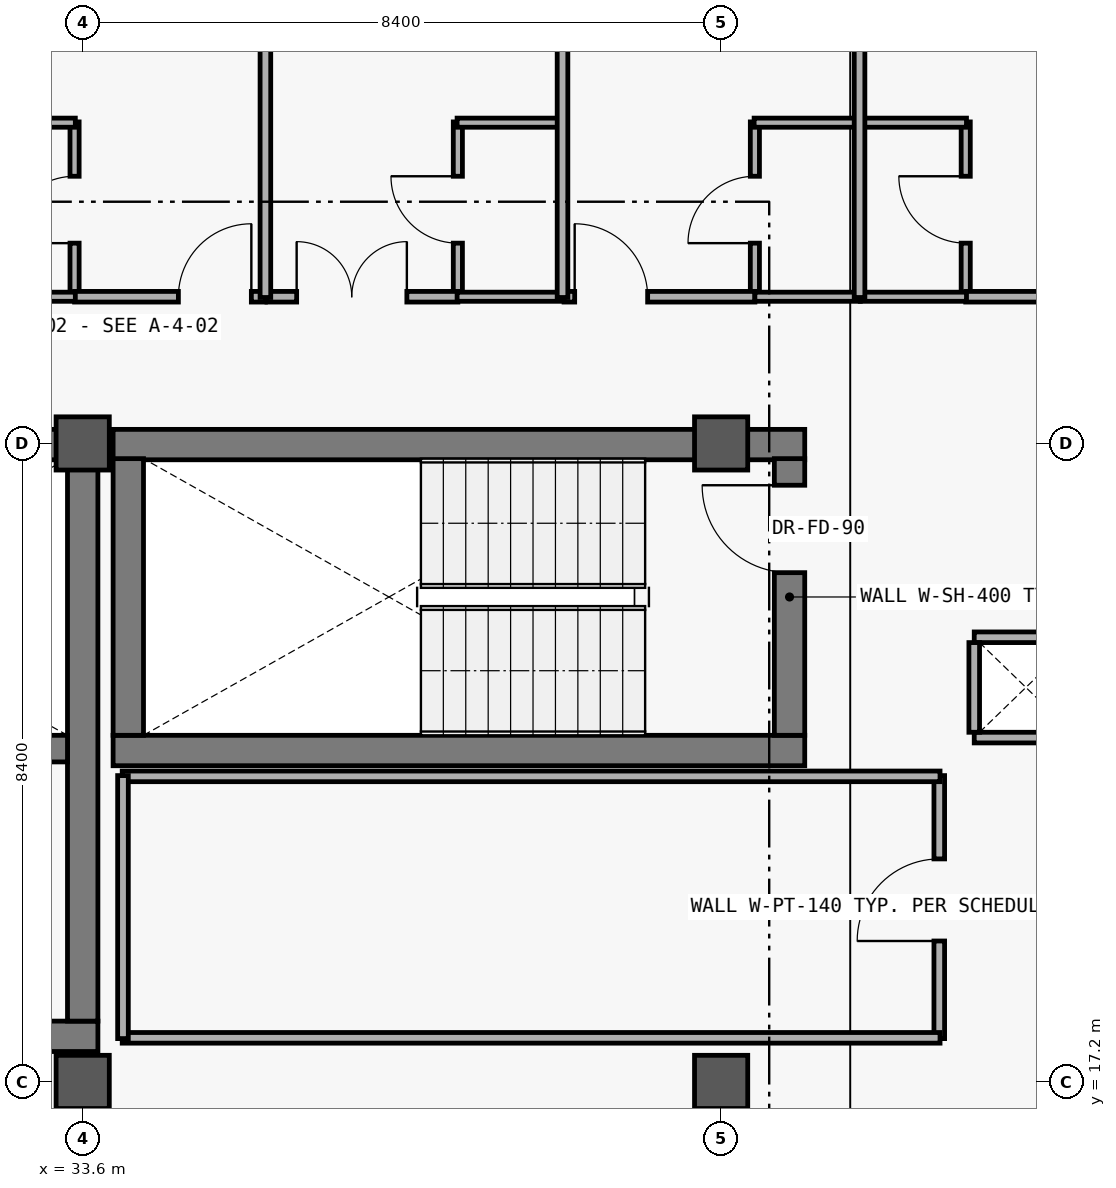
"""IFC4 building model, lengths in metres.
Left out: names, types, materials, properties, quantities, classifications, styles, units other than length and angle.
Written with IfcOpenShell. Run it as: python <this file> out.ifc"""

import sys

from ifc_helpers import new_model, si_unit, direction, frame, frame_2d, origin, origin_2d, place, context, subcontext, project, spatial, rectangle, extrude, element, fill, save


model = new_model("IFC4")
c1 = context("Model", 3, precision=1e-05, world=origin(), true_north=direction((0.0, 1.0)))
c2 = subcontext(c1, "Body", "Model", "MODEL_VIEW")
j1 = project(units=[si_unit("LENGTHUNIT", "METRE"), si_unit("PLANEANGLEUNIT", "RADIAN")], contexts=[c1])
p1 = place(None, origin())
s1 = spatial("IfcSite", under=j1, at=p1, CompositionType="ELEMENT")
p2 = place(p1, origin())
s2 = spatial("IfcBuilding", under=s1, at=p2, CompositionType="ELEMENT")
p3 = place(p2, frame((0.0, 0.0, 26.4)))
s3 = spatial("IfcBuildingStorey", under=s2, at=p3, CompositionType="ELEMENT", Elevation=26.4)
for number, where, z_axis, x_axis in (
    (1, (33.6, 17.2, 0.0), (0.0, 0.0, 1.0), (1.0, 0.0, 0.0)),
    (2, (33.6, 25.6, 0.0), (0.0, 0.0, 1.0), (1.0, 0.0, 0.0)),
    (3, (42.0, 17.2, 0.0), (0.0, 0.0, 1.0), (1.0, 0.0, 0.0)),
    (4, (42.0, 25.6, 0.0), (0.0, 0.0, 1.0), (1.0, 0.0, 0.0)),
):
    element("IfcColumn", number, at=place(p3, frame(where, z_axis=z_axis, x_axis=x_axis)), inside=s3, PredefinedType="COLUMN", context=c2, shape_type="SweptSolid", body=[
        extrude(rectangle(XDim=0.7, YDim=0.7, at=origin_2d()), origin(), (0.0, 0.0, 1.0), 3.6),
    ])
p4 = place(p3, frame((24.6, 17.8, 0.0), z_axis=(0.0, 0.0, 1.0), x_axis=(1.0, 0.0, 0.0)))
e5 = element("IfcWall", 5, at=p4, inside=s3, PredefinedType="SHEAR", context=c2, shape_type="SweptSolid", body=[
    extrude(rectangle(XDim=9.2, YDim=0.4, at=frame_2d((4.6, 0.0))), origin(), (0.0, 0.0, 1.0), 3.32),
])
p5 = place(p4, frame((1.1, 0.0, 0.0)))
e6 = element("IfcOpeningElement", 6, at=p5, cuts=e5, PredefinedType="OPENING", context=c2, shape_type="SweptSolid", body=[
    extrude(rectangle(XDim=1.2, YDim=2.2, at=frame_2d((0.6, 1.1))), frame((0.0, 0.21, 0.0), z_axis=(0.0, -1.0, 0.0), x_axis=(1.0, 0.0, 0.0)), (0.0, 0.0, 1.0), 0.42),
])
p6 = place(p4, frame((3.5, 0.0, 0.0)))
e7 = element("IfcOpeningElement", 7, at=p6, cuts=e5, PredefinedType="OPENING", context=c2, shape_type="SweptSolid", body=[
    extrude(rectangle(XDim=1.1, YDim=2.2, at=frame_2d((0.55, 1.1))), frame((0.0, 0.21, 0.0), z_axis=(0.0, -1.0, 0.0), x_axis=(1.0, 0.0, 0.0)), (0.0, 0.0, 1.0), 0.42),
])
p7 = place(p4, frame((5.9, 0.0, 0.0)))
e8 = element("IfcOpeningElement", 8, at=p7, cuts=e5, PredefinedType="OPENING", context=c2, shape_type="SweptSolid", body=[
    extrude(rectangle(XDim=1.1, YDim=2.2, at=frame_2d((0.55, 1.1))), frame((0.0, 0.21, 0.0), z_axis=(0.0, -1.0, 0.0), x_axis=(1.0, 0.0, 0.0)), (0.0, 0.0, 1.0), 0.42),
])
p8 = place(p3, frame((33.8, 25.585, 0.0), z_axis=(0.0, 0.0, 1.0), x_axis=(-1.0, 0.0, 0.0)))
e9 = element("IfcWall", 9, at=p8, inside=s3, PredefinedType="SHEAR", context=c2, shape_type="SweptSolid", body=[
    extrude(rectangle(XDim=9.2, YDim=0.4, at=frame_2d((4.6, 0.0))), origin(), (0.0, 0.0, 1.0), 3.32),
])
p9 = place(p3, frame((33.6, 18.0, 0.0), z_axis=(0.0, 0.0, 1.0), x_axis=(0.0, 1.0, 0.0)))
e10 = element("IfcWall", 10, at=p9, inside=s3, PredefinedType="SHEAR", context=c2, shape_type="SweptSolid", body=[
    extrude(rectangle(XDim=7.4, YDim=0.4, at=frame_2d((3.7, 0.0))), origin(), (0.0, 0.0, 1.0), 3.32),
])
p10 = place(p3, frame((25.0, 21.585, 0.0), z_axis=(0.0, 0.0, 1.0), x_axis=(1.0, 0.0, 0.0)))
e11 = element("IfcWall", 11, at=p10, inside=s3, PredefinedType="SHEAR", context=c2, shape_type="SweptSolid", body=[
    extrude(rectangle(XDim=8.4, YDim=0.35, at=frame_2d((4.2, 0.0))), origin(), (0.0, 0.0, 1.0), 3.32),
])
for number, where, z_axis, x_axis in (
    (12, (34.0, 21.56, 0.0), (0.0, 0.0, 1.0), (1.0, 0.0, 0.0)),
    (13, (43.1, 25.585, 0.0), (0.0, 0.0, 1.0), (-1.0, 0.0, 0.0)),
):
    element("IfcWall", number, at=place(p3, frame(where, z_axis=z_axis, x_axis=x_axis)), inside=s3, PredefinedType="SHEAR", context=c2, shape_type="SweptSolid", body=[
        extrude(rectangle(XDim=9.1, YDim=0.4, at=frame_2d((4.55, 0.0))), origin(), (0.0, 0.0, 1.0), 3.32),
    ])
p11 = place(p3, frame((34.2, 25.4, 0.0), z_axis=(0.0, 0.0, 1.0), x_axis=(0.0, -1.0, 0.0)))
e14 = element("IfcWall", 14, at=p11, inside=s3, PredefinedType="SHEAR", context=c2, shape_type="SweptSolid", body=[
    extrude(rectangle(XDim=3.64, YDim=0.4, at=frame_2d((1.82, 0.0))), origin(), (0.0, 0.0, 1.0), 3.32),
])
p12 = place(p3, frame((42.9, 21.76, 0.0), z_axis=(0.0, 0.0, 1.0), x_axis=(0.0, 1.0, 0.0)))
e15 = element("IfcWall", 15, at=p12, inside=s3, PredefinedType="SHEAR", context=c2, shape_type="SweptSolid", body=[
    extrude(rectangle(XDim=3.64, YDim=0.4, at=frame_2d((1.82, 0.0))), origin(), (0.0, 0.0, 1.0), 3.32),
])
p13 = place(p12, frame((2.14, 0.0, 0.0)))
e16 = element("IfcOpeningElement", 16, at=p13, cuts=e15, PredefinedType="OPENING", context=c2, shape_type="SweptSolid", body=[
    extrude(rectangle(XDim=1.15, YDim=2.2, at=frame_2d((0.575, 1.1))), frame((0.0, 0.21, 0.0), z_axis=(0.0, -1.0, 0.0), x_axis=(1.0, 0.0, 0.0)), (0.0, 0.0, 1.0), 0.42),
])
p14 = place(p3, frame((33.493, 27.52, 0.0), z_axis=(0.0, 0.0, 1.0), x_axis=(0.0, 1.0, 0.0)))
e17 = element("IfcWall", 17, at=p14, inside=s3, PredefinedType="PARTITIONING", context=c2, shape_type="SweptSolid", body=[
    extrude(rectangle(XDim=2.31, YDim=0.12, at=frame_2d((1.155, 0.0))), origin(), (0.0, 0.0, 1.0), 2.48),
])
p15 = place(p14, frame((0.715, 0.0, 0.0)))
e18 = element("IfcOpeningElement", 18, at=p15, cuts=e17, PredefinedType="OPENING", context=c2, shape_type="SweptSolid", body=[
    extrude(rectangle(XDim=0.88, YDim=2.15, at=frame_2d((0.44, 1.075))), frame((0.0, 0.07, 0.0), z_axis=(0.0, -1.0, 0.0), x_axis=(1.0, 0.0, 0.0)), (0.0, 0.0, 1.0), 0.14),
])
p16 = place(p3, frame((38.536, 27.52, 0.0), z_axis=(0.0, 0.0, 1.0), x_axis=(0.0, 1.0, 0.0)))
e19 = element("IfcWall", 19, at=p16, inside=s3, PredefinedType="PARTITIONING", context=c2, shape_type="SweptSolid", body=[
    extrude(rectangle(XDim=2.31, YDim=0.12, at=frame_2d((1.155, 0.0))), origin(), (0.0, 0.0, 1.0), 2.48),
])
p17 = place(p16, frame((0.715, 0.0, 0.0)))
e20 = element("IfcOpeningElement", 20, at=p17, cuts=e19, PredefinedType="OPENING", context=c2, shape_type="SweptSolid", body=[
    extrude(rectangle(XDim=0.88, YDim=2.15, at=frame_2d((0.44, 1.075))), frame((0.0, 0.07, 0.0), z_axis=(0.0, -1.0, 0.0), x_axis=(1.0, 0.0, 0.0)), (0.0, 0.0, 1.0), 0.14),
])
p18 = place(p3, frame((42.444, 27.52, 0.0), z_axis=(0.0, 0.0, 1.0), x_axis=(0.0, 1.0, 0.0)))
e21 = element("IfcWall", 21, at=p18, inside=s3, PredefinedType="PARTITIONING", context=c2, shape_type="SweptSolid", body=[
    extrude(rectangle(XDim=2.31, YDim=0.12, at=frame_2d((1.155, 0.0))), origin(), (0.0, 0.0, 1.0), 2.48),
])
p19 = place(p18, frame((0.715, 0.0, 0.0)))
e22 = element("IfcOpeningElement", 22, at=p19, cuts=e21, PredefinedType="OPENING", context=c2, shape_type="SweptSolid", body=[
    extrude(rectangle(XDim=0.88, YDim=2.15, at=frame_2d((0.44, 1.075))), frame((0.0, 0.07, 0.0), z_axis=(0.0, -1.0, 0.0), x_axis=(1.0, 0.0, 0.0)), (0.0, 0.0, 1.0), 0.14),
])
p20 = place(p3, frame((45.218, 27.52, 0.0), z_axis=(0.0, 0.0, 1.0), x_axis=(0.0, 1.0, 0.0)))
e23 = element("IfcWall", 23, at=p20, inside=s3, PredefinedType="PARTITIONING", context=c2, shape_type="SweptSolid", body=[
    extrude(rectangle(XDim=2.31, YDim=0.12, at=frame_2d((1.155, 0.0))), origin(), (0.0, 0.0, 1.0), 2.48),
])
p21 = place(p20, frame((0.715, 0.0, 0.0)))
e24 = element("IfcOpeningElement", 24, at=p21, cuts=e23, PredefinedType="OPENING", context=c2, shape_type="SweptSolid", body=[
    extrude(rectangle(XDim=0.88, YDim=2.15, at=frame_2d((0.44, 1.075))), frame((0.0, 0.07, 0.0), z_axis=(0.0, -1.0, 0.0), x_axis=(1.0, 0.0, 0.0)), (0.0, 0.0, 1.0), 0.14),
])
p22 = place(p3, frame((44.87, 17.77, 0.0), z_axis=(0.0, 0.0, 1.0), x_axis=(0.0, 1.0, 0.0)))
e25 = element("IfcWall", 25, at=p22, inside=s3, PredefinedType="PARTITIONING", context=c2, shape_type="SweptSolid", body=[
    extrude(rectangle(XDim=3.46, YDim=0.14, at=frame_2d((1.73, 0.0))), origin(), (0.0, 0.0, 1.0), 2.48),
])
p23 = place(p22, frame((1.284, 0.0, 0.0)))
e26 = element("IfcOpeningElement", 26, at=p23, cuts=e25, PredefinedType="OPENING", context=c2, shape_type="SweptSolid", body=[
    extrude(rectangle(XDim=1.08, YDim=2.25, at=frame_2d((0.54, 1.125))), frame((0.0, 0.08, 0.0), z_axis=(0.0, -1.0, 0.0), x_axis=(1.0, 0.0, 0.0)), (0.0, 0.0, 1.0), 0.16),
])
p24 = place(p3, frame((33.493, 27.53, 0.0), z_axis=(0.0, 0.0, 1.0), x_axis=(1.0, 0.0, 0.0)))
e27 = element("IfcWall", 27, at=p24, inside=s3, PredefinedType="PARTITIONING", context=c2, shape_type="SweptSolid", body=[
    extrude(rectangle(XDim=2.511, YDim=0.14, at=frame_2d((1.255, 0.0))), origin(), (0.0, 0.0, 1.0), 2.48),
])
p25 = place(p24, frame((1.366, 0.0, 0.0)))
e28 = element("IfcOpeningElement", 28, at=p25, cuts=e27, PredefinedType="OPENING", context=c2, shape_type="SweptSolid", body=[
    extrude(rectangle(XDim=0.96, YDim=2.25, at=frame_2d((0.48, 1.125))), frame((0.0, 0.08, 0.0), z_axis=(0.0, -1.0, 0.0), x_axis=(1.0, 0.0, 0.0)), (0.0, 0.0, 1.0), 0.16),
])
p26 = place(p3, frame((36.024, 27.53, 0.0), z_axis=(0.0, 0.0, 1.0), x_axis=(1.0, 0.0, 0.0)))
e29 = element("IfcWall", 29, at=p26, inside=s3, PredefinedType="PARTITIONING", context=c2, shape_type="SweptSolid", body=[
    extrude(rectangle(XDim=2.512, YDim=0.14, at=frame_2d((1.256, 0.0))), origin(), (0.0, 0.0, 1.0), 2.48),
])
p27 = place(p26, frame((0.391, 0.0, 0.0)))
e30 = element("IfcOpeningElement", 30, at=p27, cuts=e29, PredefinedType="OPENING", context=c2, shape_type="SweptSolid", body=[
    extrude(rectangle(XDim=1.45, YDim=2.3, at=frame_2d((0.725, 1.15))), frame((0.0, 0.08, 0.0), z_axis=(0.0, -1.0, 0.0), x_axis=(1.0, 0.0, 0.0)), (0.0, 0.0, 1.0), 0.16),
])
p28 = place(p3, frame((39.933, 27.53, 0.0), z_axis=(0.0, 0.0, 1.0), x_axis=(1.0, 0.0, 0.0)))
e31 = element("IfcWall", 31, at=p28, inside=s3, PredefinedType="PARTITIONING", context=c2, shape_type="SweptSolid", body=[
    extrude(rectangle(XDim=2.511, YDim=0.14, at=frame_2d((1.255, 0.0))), origin(), (0.0, 0.0, 1.0), 2.48),
])
p29 = place(p28, frame((0.14, 0.0, 0.0)))
e32 = element("IfcOpeningElement", 32, at=p29, cuts=e31, PredefinedType="OPENING", context=c2, shape_type="SweptSolid", body=[
    extrude(rectangle(XDim=0.96, YDim=2.25, at=frame_2d((0.48, 1.125))), frame((0.0, 0.08, 0.0), z_axis=(0.0, -1.0, 0.0), x_axis=(1.0, 0.0, 0.0)), (0.0, 0.0, 1.0), 0.16),
])
p30 = place(p3, frame((45.218, 27.53, 0.0), z_axis=(0.0, 0.0, 1.0), x_axis=(1.0, 0.0, 0.0)))
e33 = element("IfcWall", 33, at=p30, inside=s3, PredefinedType="PARTITIONING", context=c2, shape_type="SweptSolid", body=[
    extrude(rectangle(XDim=2.512, YDim=0.14, at=frame_2d((1.256, 0.0))), origin(), (0.0, 0.0, 1.0), 2.48),
])
p31 = place(p30, frame((1.412, 0.0, 0.0)))
e34 = element("IfcOpeningElement", 34, at=p31, cuts=e33, PredefinedType="OPENING", context=c2, shape_type="SweptSolid", body=[
    extrude(rectangle(XDim=0.96, YDim=2.25, at=frame_2d((0.48, 1.125))), frame((0.0, 0.08, 0.0), z_axis=(0.0, -1.0, 0.0), x_axis=(1.0, 0.0, 0.0)), (0.0, 0.0, 1.0), 0.16),
])
for number, where, z_axis, x_axis in (
    (35, (32.106, 27.53, 0.0), (0.0, 0.0, 1.0), (1.0, 0.0, 0.0)),
    (36, (32.106, 29.82, 0.0), (0.0, 0.0, 1.0), (1.0, 0.0, 0.0)),
):
    element("IfcWall", number, at=place(p3, frame(where, z_axis=z_axis, x_axis=x_axis)), inside=s3, PredefinedType="PARTITIONING", context=c2, shape_type="SweptSolid", body=[
        extrude(rectangle(XDim=1.397, YDim=0.12, at=frame_2d((0.698, 0.0))), origin(), (0.0, 0.0, 1.0), 2.48),
    ])
for number, where, z_axis, x_axis in (
    (37, (38.526, 27.53, 0.0), (0.0, 0.0, 1.0), (1.0, 0.0, 0.0)),
    (38, (38.526, 29.82, 0.0), (0.0, 0.0, 1.0), (1.0, 0.0, 0.0)),
):
    element("IfcWall", number, at=place(p3, frame(where, z_axis=z_axis, x_axis=x_axis)), inside=s3, PredefinedType="PARTITIONING", context=c2, shape_type="SweptSolid", body=[
        extrude(rectangle(XDim=1.397, YDim=0.12, at=frame_2d((0.699, 0.0))), origin(), (0.0, 0.0, 1.0), 2.48),
    ])
p32 = place(p3, frame((42.444, 27.53, 0.0), z_axis=(0.0, 0.0, 1.0), x_axis=(1.0, 0.0, 0.0)))
e39 = element("IfcWall", 39, at=p32, inside=s3, PredefinedType="PARTITIONING", context=c2, shape_type="SweptSolid", body=[
    extrude(rectangle(XDim=1.387, YDim=0.12, at=frame_2d((0.693, 0.0))), origin(), (0.0, 0.0, 1.0), 2.48),
])
for number, where, z_axis, x_axis in (
    (40, (42.434, 29.82, 0.0), (0.0, 0.0, 1.0), (1.0, 0.0, 0.0)),
    (41, (43.831, 27.53, 0.0), (0.0, 0.0, 1.0), (1.0, 0.0, 0.0)),
    (42, (43.831, 29.82, 0.0), (0.0, 0.0, 1.0), (1.0, 0.0, 0.0)),
):
    element("IfcWall", number, at=place(p3, frame(where, z_axis=z_axis, x_axis=x_axis)), inside=s3, PredefinedType="PARTITIONING", context=c2, shape_type="SweptSolid", body=[
        extrude(rectangle(XDim=1.397, YDim=0.12, at=frame_2d((0.698, 0.0))), origin(), (0.0, 0.0, 1.0), 2.48),
    ])
for number, where, z_axis, x_axis in (
    (43, (34.12, 17.78, 0.0), (0.0, 0.0, 1.0), (1.0, 0.0, 0.0)),
    (44, (34.12, 21.22, 0.0), (0.0, 0.0, 1.0), (1.0, 0.0, 0.0)),
):
    element("IfcWall", number, at=place(p3, frame(where, z_axis=z_axis, x_axis=x_axis)), inside=s3, PredefinedType="PARTITIONING", context=c2, shape_type="SweptSolid", body=[
        extrude(rectangle(XDim=10.76, YDim=0.14, at=frame_2d((5.38, 0.0))), origin(), (0.0, 0.0, 1.0), 2.48),
    ])
p33 = place(p3, frame((34.13, 17.77, 0.0), z_axis=(0.0, 0.0, 1.0), x_axis=(0.0, 1.0, 0.0)))
e45 = element("IfcWall", 45, at=p33, inside=s3, PredefinedType="PARTITIONING", context=c2, shape_type="SweptSolid", body=[
    extrude(rectangle(XDim=3.46, YDim=0.14, at=frame_2d((1.73, 0.0))), origin(), (0.0, 0.0, 1.0), 2.48),
])
for number, where, z_axis, x_axis in (
    (46, (36.004, 27.52, 0.0), (0.0, 0.0, 1.0), (0.0, 1.0, 0.0)),
    (47, (39.913, 27.52, 0.0), (0.0, 0.0, 1.0), (0.0, 1.0, 0.0)),
    (48, (43.821, 27.52, 0.0), (0.0, 0.0, 1.0), (0.0, 1.0, 0.0)),
):
    element("IfcWall", number, at=place(p3, frame(where, z_axis=z_axis, x_axis=x_axis)), inside=s3, PredefinedType="PARTITIONING", context=c2, shape_type="SweptSolid", body=[
        extrude(rectangle(XDim=6.2, YDim=0.14, at=frame_2d((3.1, 0.0))), origin(), (0.0, 0.0, 1.0), 2.48),
    ])
for number, where, z_axis, x_axis in (
    (49, (45.33, 21.73, 0.0), (0.0, 0.0, 1.0), (1.0, 0.0, 0.0)),
    (50, (46.69, 23.05, 0.0), (0.0, 0.0, 1.0), (-1.0, 0.0, 0.0)),
):
    element("IfcWall", number, at=place(p3, frame(where, z_axis=z_axis, x_axis=x_axis)), inside=s3, PredefinedType="PARTITIONING", context=c2, shape_type="SweptSolid", body=[
        extrude(rectangle(XDim=1.36, YDim=0.14, at=frame_2d((0.68, 0.0))), origin(), (0.0, 0.0, 1.0), 2.44),
    ])
p34 = place(p3, frame((45.33, 22.98, 0.0), z_axis=(0.0, 0.0, 1.0), x_axis=(0.0, -1.0, 0.0)))
e51 = element("IfcWall", 51, at=p34, inside=s3, PredefinedType="PARTITIONING", context=c2, shape_type="SweptSolid", body=[
    extrude(rectangle(XDim=1.18, YDim=0.14, at=frame_2d((0.59, 0.0))), origin(), (0.0, 0.0, 1.0), 2.44),
])
p35 = place(p13, origin())
e52 = element("IfcDoor", 52, at=p35, inside=s3, OperationType="SINGLE_SWING_RIGHT", PredefinedType="DOOR", context=c2, shape_type="SweptSolid", body=[
    extrude(rectangle(XDim=1.15, YDim=2.2, at=frame_2d((0.575, 1.1))), frame((0.0, 0.025, 0.0), z_axis=(0.0, -1.0, 0.0), x_axis=(1.0, 0.0, 0.0)), (0.0, 0.0, 1.0), 0.05),
])
fill(e16, e52)
p36 = place(p15, origin())
e53 = element("IfcDoor", 53, at=p36, inside=s3, OperationType="SINGLE_SWING_LEFT", PredefinedType="DOOR", context=c2, shape_type="SweptSolid", body=[
    extrude(rectangle(XDim=0.88, YDim=2.15, at=frame_2d((0.44, 1.075))), frame((0.0, 0.025, 0.0), z_axis=(0.0, -1.0, 0.0), x_axis=(1.0, 0.0, 0.0)), (0.0, 0.0, 1.0), 0.05),
])
fill(e18, e53)
p37 = place(p17, origin())
e54 = element("IfcDoor", 54, at=p37, inside=s3, OperationType="SINGLE_SWING_RIGHT", PredefinedType="DOOR", context=c2, shape_type="SweptSolid", body=[
    extrude(rectangle(XDim=0.88, YDim=2.15, at=frame_2d((0.44, 1.075))), frame((0.0, 0.025, 0.0), z_axis=(0.0, -1.0, 0.0), x_axis=(1.0, 0.0, 0.0)), (0.0, 0.0, 1.0), 0.05),
])
fill(e20, e54)
p38 = place(p19, origin())
e55 = element("IfcDoor", 55, at=p38, inside=s3, OperationType="SINGLE_SWING_LEFT", PredefinedType="DOOR", context=c2, shape_type="SweptSolid", body=[
    extrude(rectangle(XDim=0.88, YDim=2.15, at=frame_2d((0.44, 1.075))), frame((0.0, 0.025, 0.0), z_axis=(0.0, -1.0, 0.0), x_axis=(1.0, 0.0, 0.0)), (0.0, 0.0, 1.0), 0.05),
])
fill(e22, e55)
p39 = place(p21, origin())
e56 = element("IfcDoor", 56, at=p39, inside=s3, OperationType="SINGLE_SWING_RIGHT", PredefinedType="DOOR", context=c2, shape_type="SweptSolid", body=[
    extrude(rectangle(XDim=0.88, YDim=2.15, at=frame_2d((0.44, 1.075))), frame((0.0, 0.025, 0.0), z_axis=(0.0, -1.0, 0.0), x_axis=(1.0, 0.0, 0.0)), (0.0, 0.0, 1.0), 0.05),
])
fill(e24, e56)
p40 = place(p23, origin())
e57 = element("IfcDoor", 57, at=p40, inside=s3, OperationType="SINGLE_SWING_LEFT", PredefinedType="DOOR", context=c2, shape_type="SweptSolid", body=[
    extrude(rectangle(XDim=1.08, YDim=2.25, at=frame_2d((0.54, 1.125))), frame((0.0, 0.025, 0.0), z_axis=(0.0, -1.0, 0.0), x_axis=(1.0, 0.0, 0.0)), (0.0, 0.0, 1.0), 0.05),
])
fill(e26, e57)
p41 = place(p25, origin())
e58 = element("IfcDoor", 58, at=p41, inside=s3, OperationType="SINGLE_SWING_RIGHT", PredefinedType="DOOR", context=c2, shape_type="SweptSolid", body=[
    extrude(rectangle(XDim=0.96, YDim=2.25, at=frame_2d((0.48, 1.125))), frame((0.0, 0.025, 0.0), z_axis=(0.0, -1.0, 0.0), x_axis=(1.0, 0.0, 0.0)), (0.0, 0.0, 1.0), 0.05),
])
fill(e28, e58)
p42 = place(p27, origin())
e59 = element("IfcDoor", 59, at=p42, inside=s3, OperationType="DOUBLE_DOOR_SINGLE_SWING", PredefinedType="DOOR", context=c2, shape_type="SweptSolid", body=[
    extrude(rectangle(XDim=1.45, YDim=2.3, at=frame_2d((0.725, 1.15))), frame((0.0, 0.025, 0.0), z_axis=(0.0, -1.0, 0.0), x_axis=(1.0, 0.0, 0.0)), (0.0, 0.0, 1.0), 0.05),
])
fill(e30, e59)
p43 = place(p29, origin())
e60 = element("IfcDoor", 60, at=p43, inside=s3, OperationType="SINGLE_SWING_LEFT", PredefinedType="DOOR", context=c2, shape_type="SweptSolid", body=[
    extrude(rectangle(XDim=0.96, YDim=2.25, at=frame_2d((0.48, 1.125))), frame((0.0, 0.025, 0.0), z_axis=(0.0, -1.0, 0.0), x_axis=(1.0, 0.0, 0.0)), (0.0, 0.0, 1.0), 0.05),
])
fill(e32, e60)
save(model, sys.argv[1])
